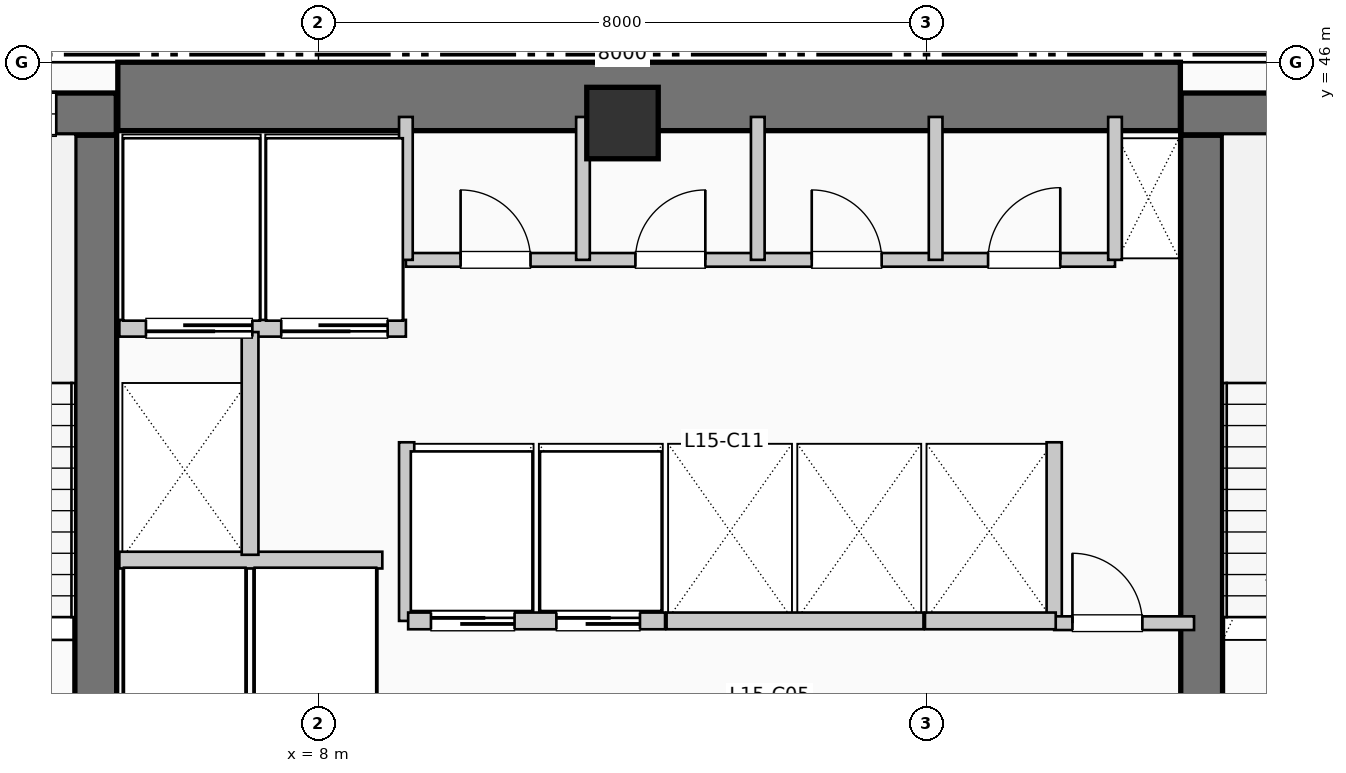
"""IFC4 building model, lengths in metres.
Left out: names, types, materials, properties, quantities, classifications, styles, units other than length and angle.
Written with IfcOpenShell. Run it as: python <this file> out.ifc"""

import sys

from ifc_helpers import new_model, si_unit, direction, frame, frame_2d, origin, origin_2d, place, context, subcontext, project, spatial, rectangle, extrude, element, fill, save


model = new_model("IFC4")
c1 = context("Model", 3, precision=1e-05, world=origin(), true_north=direction((0.0, 1.0)))
c2 = subcontext(c1, "Body", "Model", "MODEL_VIEW")
j1 = project(units=[si_unit("LENGTHUNIT", "METRE"), si_unit("PLANEANGLEUNIT", "RADIAN")], contexts=[c1])
p1 = place(None, origin())
s1 = spatial("IfcSite", under=j1, at=p1, CompositionType="ELEMENT")
p2 = place(p1, origin())
s2 = spatial("IfcBuilding", under=s1, at=p2, CompositionType="ELEMENT")
p3 = place(p2, frame((0.0, 0.0, 66.0)))
s3 = spatial("IfcBuildingStorey", under=s2, at=p3, CompositionType="ELEMENT", Elevation=66.0)
p4 = place(p3, frame((5.36, 45.55, 0.0), z_axis=(0.0, 0.0, 1.0), x_axis=(1.0, 0.0, 0.0)))
e1 = element("IfcWall", 1, at=p4, inside=s3, PredefinedType="SHEAR", context=c2, shape_type="SweptSolid", body=[
    extrude(rectangle(XDim=13.98, YDim=0.9, at=frame_2d((6.99, 0.0))), origin(), (0.0, 0.0, 1.0), 3.96),
])
p5 = place(p3, frame((5.07, 37.15, 0.0), z_axis=(0.0, 0.0, 1.0), x_axis=(0.0, 1.0, 0.0)))
e2 = element("IfcWall", 2, at=p5, inside=s3, PredefinedType="SHEAR", context=c2, shape_type="SweptSolid", body=[
    extrude(rectangle(XDim=7.89, YDim=0.55, at=frame_2d((3.945, 0.0))), origin(), (0.0, 0.0, 1.0), 3.96),
])
p6 = place(p3, frame((1.1, 45.32, 0.0), z_axis=(0.0, 0.0, 1.0), x_axis=(1.0, 0.0, 0.0)))
e3 = element("IfcWall", 3, at=p6, inside=s3, PredefinedType="SHEAR", context=c2, shape_type="SweptSolid", body=[
    extrude(rectangle(XDim=4.24, YDim=0.55, at=frame_2d((2.12, 0.0))), origin(), (0.0, 0.0, 1.0), 3.96),
])
p7 = place(p6, frame((2.05, 0.0, 1.05)))
e4 = element("IfcOpeningElement", 4, at=p7, cuts=e3, PredefinedType="OPENING", context=c2, shape_type="SweptSolid", body=[
    extrude(rectangle(XDim=1.4, YDim=1.8, at=frame_2d((0.7, 0.9))), frame((0.0, 0.285, 0.0), z_axis=(0.0, -1.0, 0.0), x_axis=(1.0, 0.0, 0.0)), (0.0, 0.0, 1.0), 0.57),
])
p8 = place(p3, frame((19.62, 37.15, 0.0), z_axis=(0.0, 0.0, 1.0), x_axis=(0.0, 1.0, 0.0)))
e5 = element("IfcWall", 5, at=p8, inside=s3, PredefinedType="SHEAR", context=c2, shape_type="SweptSolid", body=[
    extrude(rectangle(XDim=7.89, YDim=0.55, at=frame_2d((3.945, 0.0))), origin(), (0.0, 0.0, 1.0), 3.96),
])
p9 = place(p3, frame((19.35, 45.32, 0.0), z_axis=(0.0, 0.0, 1.0), x_axis=(1.0, 0.0, 0.0)))
e6 = element("IfcWall", 6, at=p9, inside=s3, PredefinedType="SHEAR", context=c2, shape_type="SweptSolid", body=[
    extrude(rectangle(XDim=3.69, YDim=0.55, at=frame_2d((1.845, 0.0))), origin(), (0.0, 0.0, 1.0), 3.96),
])
p10 = place(p9, frame((1.15, 0.0, 1.05)))
e7 = element("IfcOpeningElement", 7, at=p10, cuts=e6, PredefinedType="OPENING", context=c2, shape_type="SweptSolid", body=[
    extrude(rectangle(XDim=1.4, YDim=1.8, at=frame_2d((0.7, 0.9))), frame((0.0, 0.285, 0.0), z_axis=(0.0, -1.0, 0.0), x_axis=(1.0, 0.0, 0.0)), (0.0, 0.0, 1.0), 0.57),
])
p11 = place(p3, frame((12.0, 45.2, 0.0), z_axis=(0.0, 0.0, 1.0), x_axis=(1.0, 0.0, 0.0)))
e8 = element("IfcColumn", 8, at=p11, inside=s3, PredefinedType="COLUMN", context=c2, shape_type="SweptSolid", body=[
    extrude(rectangle(XDim=0.94, YDim=0.94, at=origin_2d()), origin(), (0.0, 0.0, 1.0), 3.96),
])
p12 = place(p3, frame((5.38, 39.45, 0.0), z_axis=(0.0, 0.0, 1.0), x_axis=(1.0, 0.0, 0.0)))
e9 = element("IfcWall", 9, at=p12, inside=s3, PredefinedType="PARTITIONING", context=c2, shape_type="SweptSolid", body=[
    extrude(rectangle(XDim=3.46, YDim=0.22, at=frame_2d((1.73, 0.0))), origin(), (0.0, 0.0, 1.0), 3.71),
])
p13 = place(p3, frame((5.38, 42.5, 0.0), z_axis=(0.0, 0.0, 1.0), x_axis=(1.0, 0.0, 0.0)))
e10 = element("IfcWall", 10, at=p13, inside=s3, PredefinedType="PARTITIONING", context=c2, shape_type="SweptSolid", body=[
    extrude(rectangle(XDim=3.77, YDim=0.22, at=frame_2d((1.885, 0.0))), origin(), (0.0, 0.0, 1.0), 3.71),
])
p14 = place(p13, frame((1.75, 0.0, 0.0), z_axis=(0.0, 0.0, 1.0), x_axis=(-1.0, 0.0, 0.0)))
e11 = element("IfcOpeningElement", 11, at=p14, cuts=e10, PredefinedType="OPENING", context=c2, shape_type="SweptSolid", body=[
    extrude(rectangle(XDim=1.4, YDim=2.2, at=frame_2d((0.7, 1.1))), frame((0.0, 0.12, 0.0), z_axis=(0.0, -1.0, 0.0), x_axis=(1.0, 0.0, 0.0)), (0.0, 0.0, 1.0), 0.24),
])
p15 = place(p13, frame((3.53, 0.0, 0.0), z_axis=(0.0, 0.0, 1.0), x_axis=(-1.0, 0.0, 0.0)))
e12 = element("IfcOpeningElement", 12, at=p15, cuts=e10, PredefinedType="OPENING", context=c2, shape_type="SweptSolid", body=[
    extrude(rectangle(XDim=1.4, YDim=2.2, at=frame_2d((0.7, 1.1))), frame((0.0, 0.12, 0.0), z_axis=(0.0, -1.0, 0.0), x_axis=(1.0, 0.0, 0.0)), (0.0, 0.0, 1.0), 0.24),
])
p16 = place(p3, frame((7.1, 39.52, 0.0), z_axis=(0.0, 0.0, 1.0), x_axis=(0.0, 1.0, 0.0)))
e13 = element("IfcWall", 13, at=p16, inside=s3, PredefinedType="PARTITIONING", context=c2, shape_type="SweptSolid", body=[
    extrude(rectangle(XDim=2.93, YDim=0.22, at=frame_2d((1.465, 0.0))), origin(), (0.0, 0.0, 1.0), 3.71),
])
for number, where, z_axis, x_axis in (
    (14, (9.16, 38.65, 0.0), (0.0, 0.0, 1.0), (0.0, 1.0, 0.0)),
    (15, (17.68, 38.65, 0.0), (0.0, 0.0, 1.0), (0.0, 1.0, 0.0)),
):
    element("IfcWall", number, at=place(p3, frame(where, z_axis=z_axis, x_axis=x_axis)), inside=s3, PredefinedType="PARTITIONING", context=c2, shape_type="SweptSolid", body=[
        extrude(rectangle(XDim=2.35, YDim=0.2, at=frame_2d((1.175, 0.0))), origin(), (0.0, 0.0, 1.0), 3.71),
    ])
p17 = place(p3, frame((17.68, 38.62, 0.0), z_axis=(0.0, 0.0, 1.0), x_axis=(1.0, 0.0, 0.0)))
e16 = element("IfcWall", 16, at=p17, inside=s3, PredefinedType="PARTITIONING", context=c2, shape_type="SweptSolid", body=[
    extrude(rectangle(XDim=1.84, YDim=0.18, at=frame_2d((0.92, 0.0))), origin(), (0.0, 0.0, 1.0), 3.71),
])
p18 = place(p17, frame((0.24, 0.0, 0.0)))
e17 = element("IfcOpeningElement", 17, at=p18, cuts=e16, PredefinedType="OPENING", context=c2, shape_type="SweptSolid", body=[
    extrude(rectangle(XDim=0.92, YDim=2.1, at=frame_2d((0.46, 1.05))), frame((0.0, 0.1, 0.0), z_axis=(0.0, -1.0, 0.0), x_axis=(1.0, 0.0, 0.0)), (0.0, 0.0, 1.0), 0.2),
])
p19 = place(p3, frame((9.18, 38.65, 0.0), z_axis=(0.0, 0.0, 1.0), x_axis=(1.0, 0.0, 0.0)))
e18 = element("IfcWall", 18, at=p19, inside=s3, PredefinedType="PARTITIONING", context=c2, shape_type="SweptSolid", body=[
    extrude(rectangle(XDim=3.38, YDim=0.22, at=frame_2d((1.69, 0.0))), origin(), (0.0, 0.0, 1.0), 3.71),
])
p20 = place(p19, frame((0.3, 0.0, 0.0)))
e19 = element("IfcOpeningElement", 19, at=p20, cuts=e18, PredefinedType="OPENING", context=c2, shape_type="SweptSolid", body=[
    extrude(rectangle(XDim=1.1, YDim=2.2, at=frame_2d((0.55, 1.1))), frame((0.0, 0.12, 0.0), z_axis=(0.0, -1.0, 0.0), x_axis=(1.0, 0.0, 0.0)), (0.0, 0.0, 1.0), 0.24),
])
p21 = place(p19, frame((1.95, 0.0, 0.0)))
e20 = element("IfcOpeningElement", 20, at=p21, cuts=e18, PredefinedType="OPENING", context=c2, shape_type="SweptSolid", body=[
    extrude(rectangle(XDim=1.1, YDim=2.2, at=frame_2d((0.55, 1.1))), frame((0.0, 0.12, 0.0), z_axis=(0.0, -1.0, 0.0), x_axis=(1.0, 0.0, 0.0)), (0.0, 0.0, 1.0), 0.24),
])
p22 = place(p3, frame((12.58, 38.65, 0.0), z_axis=(0.0, 0.0, 1.0), x_axis=(1.0, 0.0, 0.0)))
e21 = element("IfcWall", 21, at=p22, inside=s3, PredefinedType="PARTITIONING", context=c2, shape_type="SweptSolid", body=[
    extrude(rectangle(XDim=3.38, YDim=0.22, at=frame_2d((1.69, 0.0))), origin(), (0.0, 0.0, 1.0), 3.71),
])
p23 = place(p3, frame((15.98, 38.65, 0.0), z_axis=(0.0, 0.0, 1.0), x_axis=(1.0, 0.0, 0.0)))
e22 = element("IfcWall", 22, at=p23, inside=s3, PredefinedType="PARTITIONING", context=c2, shape_type="SweptSolid", body=[
    extrude(rectangle(XDim=1.72, YDim=0.22, at=frame_2d((0.86, 0.0))), origin(), (0.0, 0.0, 1.0), 3.71),
])
p24 = place(p3, frame((9.15, 43.4, 0.0), z_axis=(0.0, 0.0, 1.0), x_axis=(1.0, 0.0, 0.0)))
e23 = element("IfcWall", 23, at=p24, inside=s3, PredefinedType="PLUMBINGWALL", context=c2, shape_type="SweptSolid", body=[
    extrude(rectangle(XDim=9.33, YDim=0.18, at=frame_2d((4.665, 0.0))), origin(), (0.0, 0.0, 1.0), 3.71),
])
p25 = place(p24, frame((0.72, 0.0, 0.0)))
e24 = element("IfcOpeningElement", 24, at=p25, cuts=e23, PredefinedType="OPENING", context=c2, shape_type="SweptSolid", body=[
    extrude(rectangle(XDim=0.92, YDim=2.1, at=frame_2d((0.46, 1.05))), frame((0.0, 0.1, 0.0), z_axis=(0.0, -1.0, 0.0), x_axis=(1.0, 0.0, 0.0)), (0.0, 0.0, 1.0), 0.2),
])
p26 = place(p24, frame((3.02, 0.0, 0.0)))
e25 = element("IfcOpeningElement", 25, at=p26, cuts=e23, PredefinedType="OPENING", context=c2, shape_type="SweptSolid", body=[
    extrude(rectangle(XDim=0.92, YDim=2.1, at=frame_2d((0.46, 1.05))), frame((0.0, 0.1, 0.0), z_axis=(0.0, -1.0, 0.0), x_axis=(1.0, 0.0, 0.0)), (0.0, 0.0, 1.0), 0.2),
])
p27 = place(p24, frame((5.34, 0.0, 0.0)))
e26 = element("IfcOpeningElement", 26, at=p27, cuts=e23, PredefinedType="OPENING", context=c2, shape_type="SweptSolid", body=[
    extrude(rectangle(XDim=0.92, YDim=2.1, at=frame_2d((0.46, 1.05))), frame((0.0, 0.1, 0.0), z_axis=(0.0, -1.0, 0.0), x_axis=(1.0, 0.0, 0.0)), (0.0, 0.0, 1.0), 0.2),
])
p28 = place(p24, frame((7.66, 0.0, 0.0)))
e27 = element("IfcOpeningElement", 27, at=p28, cuts=e23, PredefinedType="OPENING", context=c2, shape_type="SweptSolid", body=[
    extrude(rectangle(XDim=0.95, YDim=2.1, at=frame_2d((0.475, 1.05))), frame((0.0, 0.1, 0.0), z_axis=(0.0, -1.0, 0.0), x_axis=(1.0, 0.0, 0.0)), (0.0, 0.0, 1.0), 0.2),
])
for number, where, z_axis, x_axis in (
    (28, (9.15, 43.4, 0.0), (0.0, 0.0, 1.0), (0.0, 1.0, 0.0)),
    (29, (18.48, 43.4, 0.0), (0.0, 0.0, 1.0), (0.0, 1.0, 0.0)),
    (30, (11.48, 43.4, 0.0), (0.0, 0.0, 1.0), (0.0, 1.0, 0.0)),
    (31, (13.78, 43.4, 0.0), (0.0, 0.0, 1.0), (0.0, 1.0, 0.0)),
    (32, (16.12, 43.4, 0.0), (0.0, 0.0, 1.0), (0.0, 1.0, 0.0)),
):
    element("IfcWall", number, at=place(p3, frame(where, z_axis=z_axis, x_axis=x_axis)), inside=s3, PredefinedType="PLUMBINGWALL", context=c2, shape_type="SweptSolid", body=[
        extrude(rectangle(XDim=1.88, YDim=0.18, at=frame_2d((0.94, 0.0))), origin(), (0.0, 0.0, 1.0), 3.71),
    ])
p29 = place(p7, origin())
e33 = element("IfcWindow", 33, at=p29, inside=s3, PartitioningType="SINGLE_PANEL", PredefinedType="WINDOW", context=c2, shape_type="SweptSolid", body=[
    extrude(rectangle(XDim=1.4, YDim=1.8, at=frame_2d((0.7, 0.9))), frame((0.0, 0.03, 0.0), z_axis=(0.0, -1.0, 0.0), x_axis=(1.0, 0.0, 0.0)), (0.0, 0.0, 1.0), 0.06),
])
fill(e4, e33)
p30 = place(p14, origin())
e34 = element("IfcDoor", 34, at=p30, inside=s3, OperationType="SLIDING_TO_LEFT", PredefinedType="DOOR", context=c2, shape_type="SweptSolid", body=[
    extrude(rectangle(XDim=1.4, YDim=2.2, at=frame_2d((0.7, 1.1))), frame((0.0, 0.025, 0.0), z_axis=(0.0, -1.0, 0.0), x_axis=(1.0, 0.0, 0.0)), (0.0, 0.0, 1.0), 0.05),
])
fill(e11, e34)
p31 = place(p15, origin())
e35 = element("IfcDoor", 35, at=p31, inside=s3, OperationType="SLIDING_TO_LEFT", PredefinedType="DOOR", context=c2, shape_type="SweptSolid", body=[
    extrude(rectangle(XDim=1.4, YDim=2.2, at=frame_2d((0.7, 1.1))), frame((0.0, 0.025, 0.0), z_axis=(0.0, -1.0, 0.0), x_axis=(1.0, 0.0, 0.0)), (0.0, 0.0, 1.0), 0.05),
])
fill(e12, e35)
p32 = place(p18, origin())
e36 = element("IfcDoor", 36, at=p32, inside=s3, OperationType="SINGLE_SWING_LEFT", PredefinedType="DOOR", context=c2, shape_type="SweptSolid", body=[
    extrude(rectangle(XDim=0.92, YDim=2.1, at=frame_2d((0.46, 1.05))), frame((0.0, 0.025, 0.0), z_axis=(0.0, -1.0, 0.0), x_axis=(1.0, 0.0, 0.0)), (0.0, 0.0, 1.0), 0.05),
])
fill(e17, e36)
p33 = place(p20, origin())
e37 = element("IfcDoor", 37, at=p33, inside=s3, OperationType="SLIDING_TO_LEFT", PredefinedType="DOOR", context=c2, shape_type="SweptSolid", body=[
    extrude(rectangle(XDim=1.1, YDim=2.2, at=frame_2d((0.55, 1.1))), frame((0.0, 0.025, 0.0), z_axis=(0.0, -1.0, 0.0), x_axis=(1.0, 0.0, 0.0)), (0.0, 0.0, 1.0), 0.05),
])
fill(e19, e37)
p34 = place(p21, origin())
e38 = element("IfcDoor", 38, at=p34, inside=s3, OperationType="SLIDING_TO_LEFT", PredefinedType="DOOR", context=c2, shape_type="SweptSolid", body=[
    extrude(rectangle(XDim=1.1, YDim=2.2, at=frame_2d((0.55, 1.1))), frame((0.0, 0.025, 0.0), z_axis=(0.0, -1.0, 0.0), x_axis=(1.0, 0.0, 0.0)), (0.0, 0.0, 1.0), 0.05),
])
fill(e20, e38)
p35 = place(p25, origin())
e39 = element("IfcDoor", 39, at=p35, inside=s3, OperationType="SINGLE_SWING_LEFT", PredefinedType="DOOR", context=c2, shape_type="SweptSolid", body=[
    extrude(rectangle(XDim=0.92, YDim=2.1, at=frame_2d((0.46, 1.05))), frame((0.0, 0.025, 0.0), z_axis=(0.0, -1.0, 0.0), x_axis=(1.0, 0.0, 0.0)), (0.0, 0.0, 1.0), 0.05),
])
fill(e24, e39)
p36 = place(p26, origin())
e40 = element("IfcDoor", 40, at=p36, inside=s3, OperationType="SINGLE_SWING_RIGHT", PredefinedType="DOOR", context=c2, shape_type="SweptSolid", body=[
    extrude(rectangle(XDim=0.92, YDim=2.1, at=frame_2d((0.46, 1.05))), frame((0.0, 0.025, 0.0), z_axis=(0.0, -1.0, 0.0), x_axis=(1.0, 0.0, 0.0)), (0.0, 0.0, 1.0), 0.05),
])
fill(e25, e40)
p37 = place(p27, origin())
e41 = element("IfcDoor", 41, at=p37, inside=s3, OperationType="SINGLE_SWING_LEFT", PredefinedType="DOOR", context=c2, shape_type="SweptSolid", body=[
    extrude(rectangle(XDim=0.92, YDim=2.1, at=frame_2d((0.46, 1.05))), frame((0.0, 0.025, 0.0), z_axis=(0.0, -1.0, 0.0), x_axis=(1.0, 0.0, 0.0)), (0.0, 0.0, 1.0), 0.05),
])
fill(e26, e41)
p38 = place(p28, origin())
e42 = element("IfcDoor", 42, at=p38, inside=s3, OperationType="SINGLE_SWING_RIGHT", PredefinedType="DOOR", context=c2, shape_type="SweptSolid", body=[
    extrude(rectangle(XDim=0.95, YDim=2.1, at=frame_2d((0.475, 1.05))), frame((0.0, 0.025, 0.0), z_axis=(0.0, -1.0, 0.0), x_axis=(1.0, 0.0, 0.0)), (0.0, 0.0, 1.0), 0.05),
])
fill(e27, e42)
save(model, sys.argv[1])
